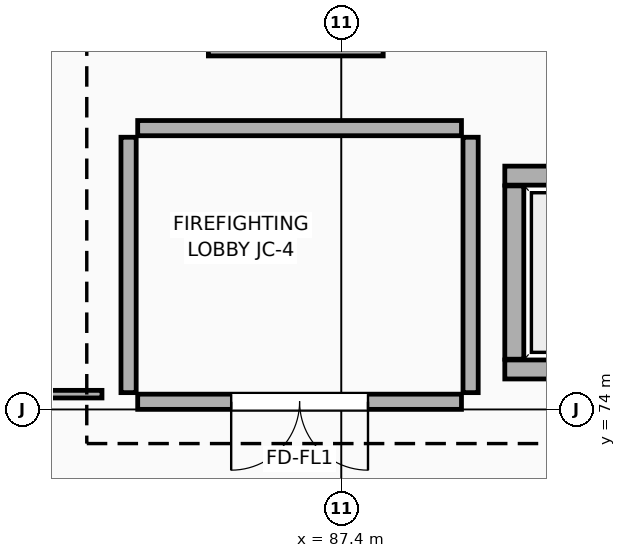
"""IFC4 building model, lengths in metres.
Left out: names, types, materials, properties, quantities, classifications, styles, units other than length and angle.
Written with IfcOpenShell. Run it as: python <this file> out.ifc"""

import sys

from ifc_helpers import new_model, si_unit, direction, frame, frame_2d, origin, place, context, subcontext, project, spatial, rectangle, extrude, element, fill, save


model = new_model("IFC4")
c1 = context("Model", 3, precision=1e-05, world=origin(), true_north=direction((0.0, 1.0)))
c2 = subcontext(c1, "Body", "Model", "MODEL_VIEW")
j1 = project(units=[si_unit("LENGTHUNIT", "METRE"), si_unit("PLANEANGLEUNIT", "RADIAN")], contexts=[c1])
p1 = place(None, origin())
s1 = spatial("IfcSite", under=j1, at=p1, CompositionType="ELEMENT")
p2 = place(p1, origin())
s2 = spatial("IfcBuilding", under=s1, at=p2, CompositionType="ELEMENT")
p3 = place(p2, frame((0.0, 0.0, 19.8)))
s3 = spatial("IfcBuildingStorey", under=s2, at=p3, CompositionType="ELEMENT", Elevation=19.8)
p4 = place(p3, frame((89.55, 74.525, 0.0), z_axis=(0.0, 0.0, 1.0), x_axis=(1.0, 0.0, 0.0)))
e1 = element("IfcWall", 1, at=p4, inside=s3, PredefinedType="STANDARD", context=c2, shape_type="SweptSolid", body=[
    extrude(rectangle(XDim=2.5, YDim=0.25, at=frame_2d((1.25, 0.0))), origin(), (0.0, 0.0, 1.0), 4.24),
])
p5 = place(p4, frame((0.65, 0.0, 0.0)))
e2 = element("IfcOpeningElement", 2, at=p5, cuts=e1, PredefinedType="OPENING", context=c2, shape_type="SweptSolid", body=[
    extrude(rectangle(XDim=1.2, YDim=2.05, at=frame_2d((0.6, 1.025))), frame((0.0, 0.135, 0.0), z_axis=(0.0, -1.0, 0.0), x_axis=(1.0, 0.0, 0.0)), (0.0, 0.0, 1.0), 0.27),
])
p6 = place(p3, frame((92.05, 77.075, 0.0), z_axis=(0.0, 0.0, 1.0), x_axis=(-1.0, 0.0, 0.0)))
e3 = element("IfcWall", 3, at=p6, inside=s3, PredefinedType="STANDARD", context=c2, shape_type="SweptSolid", body=[
    extrude(rectangle(XDim=2.5, YDim=0.25, at=frame_2d((1.25, 0.0))), origin(), (0.0, 0.0, 1.0), 4.24),
])
p7 = place(p3, frame((89.675, 76.94, 0.0), z_axis=(0.0, 0.0, 1.0), x_axis=(0.0, -1.0, 0.0)))
e4 = element("IfcWall", 4, at=p7, inside=s3, PredefinedType="STANDARD", context=c2, shape_type="SweptSolid", body=[
    extrude(rectangle(XDim=2.28, YDim=0.25, at=frame_2d((1.14, 0.0))), origin(), (0.0, 0.0, 1.0), 4.24),
])
p8 = place(p3, frame((85.65, 78.775, 0.0), z_axis=(0.0, 0.0, 1.0), x_axis=(1.0, 0.0, 0.0)))
e5 = element("IfcWall", 5, at=p8, inside=s3, PredefinedType="STANDARD", context=c2, shape_type="SweptSolid", body=[
    extrude(rectangle(XDim=2.3, YDim=0.25, at=frame_2d((1.15, 0.0))), origin(), (0.0, 0.0, 1.0), 4.24),
])
p9 = place(p3, frame((84.6, 74.22, 0.0), z_axis=(0.0, 0.0, 1.0), x_axis=(0.0, 1.0, 0.0)))
e6 = element("IfcWall", 6, at=p9, inside=s3, PredefinedType="PARTITIONING", context=c2, shape_type="SweptSolid", body=[
    extrude(rectangle(XDim=3.36, YDim=0.2, at=frame_2d((1.68, 0.0))), origin(), (0.0, 0.0, 1.0), 4.24),
])
p10 = place(p3, frame((84.72, 77.7, 0.0), z_axis=(0.0, 0.0, 1.0), x_axis=(1.0, 0.0, 0.0)))
e7 = element("IfcWall", 7, at=p10, inside=s3, PredefinedType="PARTITIONING", context=c2, shape_type="SweptSolid", body=[
    extrude(rectangle(XDim=4.26, YDim=0.2, at=frame_2d((2.13, 0.0))), origin(), (0.0, 0.0, 1.0), 4.24),
])
p11 = place(p3, frame((89.1, 77.58, 0.0), z_axis=(0.0, 0.0, 1.0), x_axis=(0.0, -1.0, 0.0)))
e8 = element("IfcWall", 8, at=p11, inside=s3, PredefinedType="PARTITIONING", context=c2, shape_type="SweptSolid", body=[
    extrude(rectangle(XDim=3.36, YDim=0.2, at=frame_2d((1.68, 0.0))), origin(), (0.0, 0.0, 1.0), 4.24),
])
p12 = place(p3, frame((88.98, 74.1, 0.0), z_axis=(0.0, 0.0, 1.0), x_axis=(-1.0, 0.0, 0.0)))
e9 = element("IfcWall", 9, at=p12, inside=s3, PredefinedType="PARTITIONING", context=c2, shape_type="SweptSolid", body=[
    extrude(rectangle(XDim=4.26, YDim=0.2, at=frame_2d((2.13, 0.0))), origin(), (0.0, 0.0, 1.0), 4.24),
])
p13 = place(p12, frame((1.23, 0.0, 0.0)))
e10 = element("IfcOpeningElement", 10, at=p13, cuts=e9, PredefinedType="OPENING", context=c2, shape_type="SweptSolid", body=[
    extrude(rectangle(XDim=1.8, YDim=2.15, at=frame_2d((0.9, 1.075))), frame((0.0, 0.11, 0.0), z_axis=(0.0, -1.0, 0.0), x_axis=(1.0, 0.0, 0.0)), (0.0, 0.0, 1.0), 0.22),
])
p14 = place(p3, frame((84.25, 74.2, 0.0), z_axis=(0.0, 0.0, 1.0), x_axis=(-1.0, 0.0, 0.0)))
e11 = element("IfcWall", 11, at=p14, inside=s3, PredefinedType="PARTITIONING", context=c2, shape_type="SweptSolid", body=[
    extrude(rectangle(XDim=4.51, YDim=0.1, at=frame_2d((2.255, 0.0))), origin(), (0.0, 0.0, 1.0), 4.24),
])
p15 = place(p13, origin())
e12 = element("IfcDoor", 12, at=p15, inside=s3, OperationType="DOUBLE_DOOR_SINGLE_SWING", PredefinedType="DOOR", context=c2, shape_type="SweptSolid", body=[
    extrude(rectangle(XDim=1.8, YDim=2.15, at=frame_2d((0.9, 1.075))), frame((0.0, 0.025, 0.0), z_axis=(0.0, -1.0, 0.0), x_axis=(1.0, 0.0, 0.0)), (0.0, 0.0, 1.0), 0.05),
])
fill(e10, e12)
save(model, sys.argv[1])
